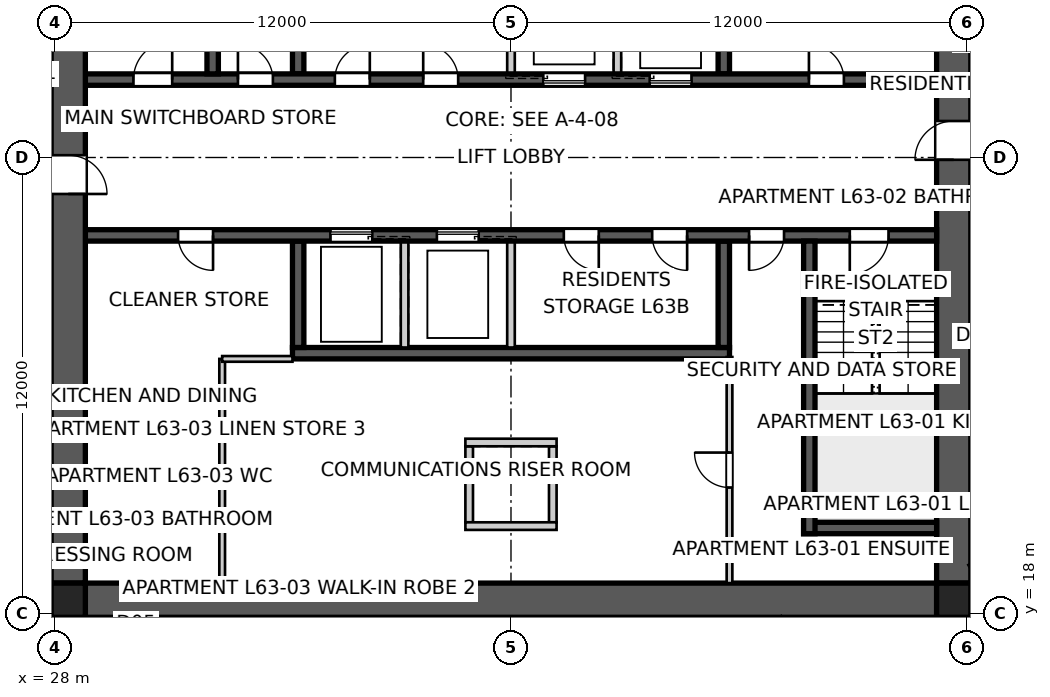
"""IFC4 building model, lengths in metres.
Left out: names, types, materials, properties, quantities, classifications, styles, units other than length and angle.
Written with IfcOpenShell. Run it as: python <this file> out.ifc"""

import sys

from ifc_helpers import new_model, si_unit, direction, frame, frame_2d, origin, origin_2d, place, context, subcontext, project, spatial, polyline, rectangle, outline, extrude, element, fill, save


model = new_model("IFC4")
c1 = context("Model", 3, precision=1e-05, world=origin(), true_north=direction((0.0, 1.0)))
c2 = subcontext(c1, "Body", "Model", "MODEL_VIEW")
j1 = project(units=[si_unit("LENGTHUNIT", "METRE"), si_unit("PLANEANGLEUNIT", "RADIAN")], contexts=[c1])
p1 = place(None, origin())
s1 = spatial("IfcSite", under=j1, at=p1, CompositionType="ELEMENT")
p2 = place(p1, origin())
s2 = spatial("IfcBuilding", under=s1, at=p2, CompositionType="ELEMENT")
p3 = place(p2, frame((0.0, 0.0, 228.6)))
s3 = spatial("IfcBuildingStorey", under=s2, at=p3, CompositionType="ELEMENT", Elevation=228.6)
p4 = place(p3, frame((51.2, 18.35, 0.0), z_axis=(0.0, 0.0, 1.0), x_axis=(-1.0, 0.0, 0.0)))
e1 = element("IfcWall", 1, at=p4, inside=s3, PredefinedType="SHEAR", context=c2, shape_type="SweptSolid", body=[
    extrude(outline(polyline([(0.0, -0.45), (22.4, -0.45), (22.4, -0.025), (22.85, -0.025), (22.85, 0.025), (22.4, 0.025), (22.4, 0.45), (0.0, 0.45), (0.0, 0.025), (-0.45, 0.025), (-0.45, -0.025), (0.0, -0.025), (0.0, -0.45)])), origin(), (0.0, 0.0, 1.0), 3.4),
])
p5 = place(p3, frame((51.65, 18.8, 0.0), z_axis=(0.0, 0.0, 1.0), x_axis=(0.0, 1.0, 0.0)))
e2 = element("IfcWall", 2, at=p5, inside=s3, PredefinedType="SHEAR", context=c2, shape_type="SweptSolid", body=[
    extrude(outline(polyline([(0.0, -0.45), (22.4, -0.45), (22.4, -0.025), (22.85, -0.025), (22.85, 0.025), (22.4, 0.025), (22.4, 0.45), (0.0, 0.45), (0.0, 0.025), (-0.45, 0.025), (-0.45, -0.025), (0.0, -0.025), (0.0, -0.45)])), origin(), (0.0, 0.0, 1.0), 3.4),
])
p6 = place(p5, frame((11.14, 0.0, 0.0)))
e3 = element("IfcOpeningElement", 3, at=p6, cuts=e2, PredefinedType="OPENING", context=c2, shape_type="SweptSolid", body=[
    extrude(rectangle(XDim=1.02, YDim=2.4, at=frame_2d((0.51, 1.2))), frame((0.0, 0.46, 0.0), z_axis=(0.0, -1.0, 0.0), x_axis=(1.0, 0.0, 0.0)), (0.0, 0.0, 1.0), 0.92),
])
p7 = place(p3, frame((28.35, 41.2, 0.0), z_axis=(0.0, 0.0, 1.0), x_axis=(0.0, -1.0, 0.0)))
e4 = element("IfcWall", 4, at=p7, inside=s3, PredefinedType="SHEAR", context=c2, shape_type="SweptSolid", body=[
    extrude(outline(polyline([(0.0, -0.45), (22.4, -0.45), (22.4, -0.025), (22.85, -0.025), (22.85, 0.025), (22.4, 0.025), (22.4, 0.45), (0.0, 0.45), (0.0, 0.025), (-0.45, 0.025), (-0.45, -0.025), (0.0, -0.025), (0.0, -0.45)])), origin(), (0.0, 0.0, 1.0), 3.4),
])
p8 = place(p7, frame((11.14, 0.0, 0.0)))
e5 = element("IfcOpeningElement", 5, at=p8, cuts=e4, PredefinedType="OPENING", context=c2, shape_type="SweptSolid", body=[
    extrude(rectangle(XDim=1.02, YDim=2.4, at=frame_2d((0.51, 1.2))), frame((0.0, 0.46, 0.0), z_axis=(0.0, -1.0, 0.0), x_axis=(1.0, 0.0, 0.0)), (0.0, 0.0, 1.0), 0.92),
])
p9 = place(p3, frame((28.8, 32.05, 0.0), z_axis=(0.0, 0.0, 1.0), x_axis=(1.0, 0.0, 0.0)))
e6 = element("IfcWall", 6, at=p9, inside=s3, PredefinedType="SHEAR", context=c2, shape_type="SweptSolid", body=[
    extrude(rectangle(XDim=22.4, YDim=0.3, at=frame_2d((11.2, 0.0))), origin(), (0.0, 0.0, 1.0), 3.4),
])
p10 = place(p9, frame((19.04, 0.0, 0.0)))
e7 = element("IfcOpeningElement", 7, at=p10, cuts=e6, PredefinedType="OPENING", context=c2, shape_type="SweptSolid", body=[
    extrude(rectangle(XDim=0.92, YDim=2.1, at=frame_2d((0.46, 1.05))), frame((0.0, 0.16, 0.0), z_axis=(0.0, -1.0, 0.0), x_axis=(1.0, 0.0, 0.0)), (0.0, 0.0, 1.0), 0.32),
])
p11 = place(p9, frame((1.265, 0.0, 0.0)))
e8 = element("IfcOpeningElement", 8, at=p11, cuts=e6, PredefinedType="OPENING", context=c2, shape_type="SweptSolid", body=[
    extrude(rectangle(XDim=1.02, YDim=2.1, at=frame_2d((0.51, 1.05))), frame((0.0, 0.16, 0.0), z_axis=(0.0, -1.0, 0.0), x_axis=(1.0, 0.0, 0.0)), (0.0, 0.0, 1.0), 0.32),
])
p12 = place(p9, frame((4.015, 0.0, 0.0)))
e9 = element("IfcOpeningElement", 9, at=p12, cuts=e6, PredefinedType="OPENING", context=c2, shape_type="SweptSolid", body=[
    extrude(rectangle(XDim=0.92, YDim=2.1, at=frame_2d((0.46, 1.05))), frame((0.0, 0.16, 0.0), z_axis=(0.0, -1.0, 0.0), x_axis=(1.0, 0.0, 0.0)), (0.0, 0.0, 1.0), 0.32),
])
p13 = place(p9, frame((6.565, 0.0, 0.0)))
e10 = element("IfcOpeningElement", 10, at=p13, cuts=e6, PredefinedType="OPENING", context=c2, shape_type="SweptSolid", body=[
    extrude(rectangle(XDim=0.92, YDim=2.1, at=frame_2d((0.46, 1.05))), frame((0.0, 0.16, 0.0), z_axis=(0.0, -1.0, 0.0), x_axis=(1.0, 0.0, 0.0)), (0.0, 0.0, 1.0), 0.32),
])
p14 = place(p9, frame((8.89, 0.0, 0.0)))
e11 = element("IfcOpeningElement", 11, at=p14, cuts=e6, PredefinedType="OPENING", context=c2, shape_type="SweptSolid", body=[
    extrude(rectangle(XDim=0.92, YDim=2.1, at=frame_2d((0.46, 1.05))), frame((0.0, 0.16, 0.0), z_axis=(0.0, -1.0, 0.0), x_axis=(1.0, 0.0, 0.0)), (0.0, 0.0, 1.0), 0.32),
])
p15 = place(p9, frame((12.05, 0.0, 0.0)))
e12 = element("IfcOpeningElement", 12, at=p15, cuts=e6, PredefinedType="OPENING", context=c2, shape_type="SweptSolid", body=[
    extrude(rectangle(XDim=1.1, YDim=2.1, at=frame_2d((0.55, 1.05))), frame((0.0, 0.16, 0.0), z_axis=(0.0, -1.0, 0.0), x_axis=(1.0, 0.0, 0.0)), (0.0, 0.0, 1.0), 0.32),
])
p16 = place(p9, frame((14.85, 0.0, 0.0)))
e13 = element("IfcOpeningElement", 13, at=p16, cuts=e6, PredefinedType="OPENING", context=c2, shape_type="SweptSolid", body=[
    extrude(rectangle(XDim=1.1, YDim=2.1, at=frame_2d((0.55, 1.05))), frame((0.0, 0.16, 0.0), z_axis=(0.0, -1.0, 0.0), x_axis=(1.0, 0.0, 0.0)), (0.0, 0.0, 1.0), 0.32),
])
p17 = place(p3, frame((51.2, 27.95, 0.0), z_axis=(0.0, 0.0, 1.0), x_axis=(-1.0, 0.0, 0.0)))
e14 = element("IfcWall", 14, at=p17, inside=s3, PredefinedType="SHEAR", context=c2, shape_type="SweptSolid", body=[
    extrude(rectangle(XDim=22.4, YDim=0.3, at=frame_2d((11.2, 0.0))), origin(), (0.0, 0.0, 1.0), 3.4),
])
p18 = place(p17, frame((19.04, 0.0, 0.0)))
e15 = element("IfcOpeningElement", 15, at=p18, cuts=e14, PredefinedType="OPENING", context=c2, shape_type="SweptSolid", body=[
    extrude(rectangle(XDim=0.92, YDim=2.1, at=frame_2d((0.46, 1.05))), frame((0.0, 0.16, 0.0), z_axis=(0.0, -1.0, 0.0), x_axis=(1.0, 0.0, 0.0)), (0.0, 0.0, 1.0), 0.32),
])
p19 = place(p17, frame((1.265, 0.0, 0.0)))
e16 = element("IfcOpeningElement", 16, at=p19, cuts=e14, PredefinedType="OPENING", context=c2, shape_type="SweptSolid", body=[
    extrude(rectangle(XDim=1.02, YDim=2.1, at=frame_2d((0.51, 1.05))), frame((0.0, 0.16, 0.0), z_axis=(0.0, -1.0, 0.0), x_axis=(1.0, 0.0, 0.0)), (0.0, 0.0, 1.0), 0.32),
])
p20 = place(p17, frame((4.015, 0.0, 0.0)))
e17 = element("IfcOpeningElement", 17, at=p20, cuts=e14, PredefinedType="OPENING", context=c2, shape_type="SweptSolid", body=[
    extrude(rectangle(XDim=0.92, YDim=2.1, at=frame_2d((0.46, 1.05))), frame((0.0, 0.16, 0.0), z_axis=(0.0, -1.0, 0.0), x_axis=(1.0, 0.0, 0.0)), (0.0, 0.0, 1.0), 0.32),
])
p21 = place(p17, frame((8.89, 0.0, 0.0)))
e18 = element("IfcOpeningElement", 18, at=p21, cuts=e14, PredefinedType="OPENING", context=c2, shape_type="SweptSolid", body=[
    extrude(rectangle(XDim=0.92, YDim=2.1, at=frame_2d((0.46, 1.05))), frame((0.0, 0.16, 0.0), z_axis=(0.0, -1.0, 0.0), x_axis=(1.0, 0.0, 0.0)), (0.0, 0.0, 1.0), 0.32),
])
p22 = place(p17, frame((6.565, 0.0, 0.0)))
e19 = element("IfcOpeningElement", 19, at=p22, cuts=e14, PredefinedType="OPENING", context=c2, shape_type="SweptSolid", body=[
    extrude(rectangle(XDim=0.92, YDim=2.1, at=frame_2d((0.46, 1.05))), frame((0.0, 0.16, 0.0), z_axis=(0.0, -1.0, 0.0), x_axis=(1.0, 0.0, 0.0)), (0.0, 0.0, 1.0), 0.32),
])
p23 = place(p17, frame((12.05, 0.0, 0.0)))
e20 = element("IfcOpeningElement", 20, at=p23, cuts=e14, PredefinedType="OPENING", context=c2, shape_type="SweptSolid", body=[
    extrude(rectangle(XDim=1.1, YDim=2.1, at=frame_2d((0.55, 1.05))), frame((0.0, 0.16, 0.0), z_axis=(0.0, -1.0, 0.0), x_axis=(1.0, 0.0, 0.0)), (0.0, 0.0, 1.0), 0.32),
])
p24 = place(p17, frame((14.85, 0.0, 0.0)))
e21 = element("IfcOpeningElement", 21, at=p24, cuts=e14, PredefinedType="OPENING", context=c2, shape_type="SweptSolid", body=[
    extrude(rectangle(XDim=1.1, YDim=2.1, at=frame_2d((0.55, 1.05))), frame((0.0, 0.16, 0.0), z_axis=(0.0, -1.0, 0.0), x_axis=(1.0, 0.0, 0.0)), (0.0, 0.0, 1.0), 0.32),
])
p25 = place(p3, frame((45.75, 24.85, 0.0), z_axis=(0.0, 0.0, 1.0), x_axis=(-1.0, 0.0, 0.0)))
e22 = element("IfcWall", 22, at=p25, inside=s3, PredefinedType="SHEAR", context=c2, shape_type="SweptSolid", body=[
    extrude(rectangle(XDim=11.5, YDim=0.3, at=frame_2d((5.75, 0.0))), origin(), (0.0, 0.0, 1.0), 3.4),
])
for number, where, z_axis, x_axis in (
    (23, (34.4, 32.2, 0.0), (0.0, 0.0, 1.0), (0.0, 1.0, 0.0)),
    (24, (45.6, 27.8, 0.0), (0.0, 0.0, 1.0), (0.0, -1.0, 0.0)),
):
    element("IfcWall", number, at=place(p3, frame(where, z_axis=z_axis, x_axis=x_axis)), inside=s3, PredefinedType="SHEAR", context=c2, shape_type="SweptSolid", body=[
        extrude(rectangle(XDim=2.8, YDim=0.3, at=frame_2d((1.4, 0.0))), origin(), (0.0, 0.0, 1.0), 3.4),
    ])
for number, where, z_axis, x_axis in (
    (25, (40.0, 32.2, 0.0), (0.0, 0.0, 1.0), (0.0, 1.0, 0.0)),
    (26, (40.0, 27.8, 0.0), (0.0, 0.0, 1.0), (0.0, -1.0, 0.0)),
    (27, (42.8, 32.2, 0.0), (0.0, 0.0, 1.0), (0.0, 1.0, 0.0)),
    (28, (37.2, 27.8, 0.0), (0.0, 0.0, 1.0), (0.0, -1.0, 0.0)),
):
    element("IfcWall", number, at=place(p3, frame(where, z_axis=z_axis, x_axis=x_axis)), inside=s3, PredefinedType="SOLIDWALL", context=c2, shape_type="SweptSolid", body=[
        extrude(rectangle(XDim=2.8, YDim=0.2, at=frame_2d((1.4, 0.0))), origin(), (0.0, 0.0, 1.0), 3.4),
    ])
for number, where, z_axis, x_axis in (
    (29, (45.6, 32.2, 0.0), (0.0, 0.0, 1.0), (0.0, 1.0, 0.0)),
    (30, (34.4, 27.8, 0.0), (0.0, 0.0, 1.0), (0.0, -1.0, 0.0)),
):
    element("IfcWall", number, at=place(p3, frame(where, z_axis=z_axis, x_axis=x_axis)), inside=s3, PredefinedType="SHEAR", context=c2, shape_type="SweptSolid", body=[
        extrude(rectangle(XDim=2.8, YDim=0.3, at=frame_2d((1.4, 0.0))), origin(), (0.0, 0.0, 1.0), 3.4),
    ])
for number, where, z_axis, x_axis in (
    (31, (32.15, 32.2, 0.0), (0.0, 0.0, 1.0), (0.0, 1.0, 0.0)),
    (32, (47.85, 27.8, 0.0), (0.0, 0.0, 1.0), (0.0, -1.0, 0.0)),
):
    element("IfcWall", number, at=place(p3, frame(where, z_axis=z_axis, x_axis=x_axis)), inside=s3, PredefinedType="SHEAR", context=c2, shape_type="SweptSolid", body=[
        extrude(rectangle(XDim=7.7, YDim=0.3, at=frame_2d((3.85, 0.0))), origin(), (0.0, 0.0, 1.0), 3.4),
    ])
p26 = place(p3, frame((51.2, 20.25, 0.0), z_axis=(0.0, 0.0, 1.0), x_axis=(-1.0, 0.0, 0.0)))
e33 = element("IfcWall", 33, at=p26, inside=s3, PredefinedType="SHEAR", context=c2, shape_type="SweptSolid", body=[
    extrude(rectangle(XDim=3.5, YDim=0.3, at=frame_2d((1.75, 0.0))), origin(), (0.0, 0.0, 1.0), 3.4),
])
for number, where, z_axis, x_axis in (
    (34, (38.9, 22.4, 0.0), (0.0, 0.0, 1.0), (0.0, -1.0, 0.0)),
    (35, (41.1, 22.4, 0.0), (0.0, 0.0, 1.0), (0.0, -1.0, 0.0)),
):
    element("IfcWall", number, at=place(p3, frame(where, z_axis=z_axis, x_axis=x_axis)), inside=s3, PredefinedType="SOLIDWALL", context=c2, shape_type="SweptSolid", body=[
        extrude(rectangle(XDim=2.0, YDim=0.2, at=frame_2d((1.0, 0.0))), origin(), (0.0, 0.0, 1.0), 3.4),
    ])
for number, where, z_axis, x_axis in (
    (36, (38.8, 22.5, 0.0), (0.0, 0.0, 1.0), (1.0, 0.0, 0.0)),
    (37, (38.8, 20.3, 0.0), (0.0, 0.0, 1.0), (1.0, 0.0, 0.0)),
):
    element("IfcWall", number, at=place(p3, frame(where, z_axis=z_axis, x_axis=x_axis)), inside=s3, PredefinedType="SOLIDWALL", context=c2, shape_type="SweptSolid", body=[
        extrude(rectangle(XDim=2.4, YDim=0.2, at=frame_2d((1.2, 0.0))), origin(), (0.0, 0.0, 1.0), 3.4),
    ])
for number, where, z_axis, x_axis in (
    (38, (28.35, 18.35, 0.0), (0.0, 0.0, 1.0), (1.0, 0.0, 0.0)),
    (39, (51.65, 18.35, 0.0), (0.0, 0.0, 1.0), (1.0, 0.0, 0.0)),
):
    element("IfcColumn", number, at=place(p3, frame(where, z_axis=z_axis, x_axis=x_axis)), inside=s3, PredefinedType="COLUMN", context=c2, shape_type="SweptSolid", body=[
        extrude(rectangle(XDim=0.9, YDim=0.9, at=origin_2d()), origin(), (0.0, 0.0, 1.0), 3.4),
    ])
p27 = place(p3, frame((51.25, 10.514, 0.0), z_axis=(0.0, 0.0, 1.0), x_axis=(-0.500008511703, 0.866020489494, 0.0)))
e40 = element("IfcWall", 40, at=p27, inside=s3, PredefinedType="PARTITIONING", context=c2, shape_type="SweptSolid", body=[
    extrude(rectangle(XDim=8.496, YDim=0.25, at=frame_2d((4.248, 0.0))), origin(), (0.0, 0.0, 1.0), 3.25),
])
p28 = place(p3, frame((45.75, 18.8, 0.0), z_axis=(0.0, 0.0, 1.0), x_axis=(0.0, 1.0, 0.0)))
e41 = element("IfcWall", 41, at=p28, inside=s3, PredefinedType="SOLIDWALL", context=c2, shape_type="SweptSolid", body=[
    extrude(rectangle(XDim=5.95, YDim=0.15, at=frame_2d((2.975, 0.0))), origin(), (0.0, 0.0, 1.0), 3.25),
])
p29 = place(p28, frame((2.515, 0.0, 0.0)))
e42 = element("IfcOpeningElement", 42, at=p29, cuts=e41, PredefinedType="OPENING", context=c2, shape_type="SweptSolid", body=[
    extrude(rectangle(XDim=0.92, YDim=2.1, at=frame_2d((0.46, 1.05))), frame((0.0, 0.085, 0.0), z_axis=(0.0, -1.0, 0.0), x_axis=(1.0, 0.0, 0.0)), (0.0, 0.0, 1.0), 0.17),
])
p30 = place(p3, frame((32.4, 18.8, 0.0), z_axis=(0.0, 0.0, 1.0), x_axis=(0.0, 1.0, 0.0)))
e43 = element("IfcWall", 43, at=p30, inside=s3, PredefinedType="SOLIDWALL", context=c2, shape_type="SweptSolid", body=[
    extrude(rectangle(XDim=5.9, YDim=0.15, at=frame_2d((2.95, 0.0))), origin(), (0.0, 0.0, 1.0), 3.25),
])
p31 = place(p3, frame((32.4, 24.7, 0.0), z_axis=(0.0, 0.0, 1.0), x_axis=(1.0, 0.0, 0.0)))
e44 = element("IfcWall", 44, at=p31, inside=s3, PredefinedType="SOLIDWALL", context=c2, shape_type="SweptSolid", body=[
    extrude(rectangle(XDim=1.85, YDim=0.15, at=frame_2d((0.925, 0.0))), origin(), (0.0, 0.0, 1.0), 3.25),
])
p32 = place(p3, frame((53.779, 16.406, 0.0), z_axis=(0.0, 0.0, 1.0), x_axis=(-0.499969954228, 0.866042750024, 0.0)))
e45 = element("IfcWall", 45, at=p32, inside=s3, PredefinedType="SOLIDWALL", context=c2, shape_type="SweptSolid", body=[
    extrude(rectangle(XDim=3.359, YDim=0.15, at=frame_2d((1.679, 0.0))), origin(), (0.0, 0.0, 1.0), 3.25),
])
p33 = place(p32, frame((0.301, 0.0, 0.0)))
e46 = element("IfcOpeningElement", 46, at=p33, cuts=e45, PredefinedType="OPENING", context=c2, shape_type="SweptSolid", body=[
    extrude(rectangle(XDim=0.92, YDim=2.1, at=frame_2d((0.46, 1.05))), frame((0.0, 0.085, 0.0), z_axis=(0.0, -1.0, 0.0), x_axis=(1.0, 0.0, 0.0)), (0.0, 0.0, 1.0), 0.17),
])
p34 = place(p3, frame((28.8, 17.9, 0.0), z_axis=(0.0, 0.0, 1.0), x_axis=(-1.0, 0.0, 0.0)))
e47 = element("IfcWall", 47, at=p34, inside=s3, PredefinedType="SOLIDWALL", context=c2, shape_type="SweptSolid", body=[
    extrude(rectangle(XDim=1.342, YDim=0.15, at=frame_2d((0.671, 0.0))), origin(), (0.0, 0.0, 1.0), 3.25),
])
p35 = place(p10, origin())
e48 = element("IfcDoor", 48, at=p35, inside=s3, OperationType="SINGLE_SWING_LEFT", PredefinedType="DOOR", context=c2, shape_type="SweptSolid", body=[
    extrude(rectangle(XDim=0.92, YDim=2.1, at=frame_2d((0.46, 1.05))), frame((0.0, 0.025, 0.0), z_axis=(0.0, -1.0, 0.0), x_axis=(1.0, 0.0, 0.0)), (0.0, 0.0, 1.0), 0.05),
])
fill(e7, e48)
p36 = place(p18, origin())
e49 = element("IfcDoor", 49, at=p36, inside=s3, OperationType="SINGLE_SWING_LEFT", PredefinedType="DOOR", context=c2, shape_type="SweptSolid", body=[
    extrude(rectangle(XDim=0.92, YDim=2.1, at=frame_2d((0.46, 1.05))), frame((0.0, 0.025, 0.0), z_axis=(0.0, -1.0, 0.0), x_axis=(1.0, 0.0, 0.0)), (0.0, 0.0, 1.0), 0.05),
])
fill(e15, e49)
p37 = place(p19, origin())
e50 = element("IfcDoor", 50, at=p37, inside=s3, OperationType="SINGLE_SWING_RIGHT", PredefinedType="DOOR", context=c2, shape_type="SweptSolid", body=[
    extrude(rectangle(XDim=1.02, YDim=2.1, at=frame_2d((0.51, 1.05))), frame((0.0, 0.025, 0.0), z_axis=(0.0, -1.0, 0.0), x_axis=(1.0, 0.0, 0.0)), (0.0, 0.0, 1.0), 0.05),
])
fill(e16, e50)
p38 = place(p11, origin())
e51 = element("IfcDoor", 51, at=p38, inside=s3, OperationType="SINGLE_SWING_RIGHT", PredefinedType="DOOR", context=c2, shape_type="SweptSolid", body=[
    extrude(rectangle(XDim=1.02, YDim=2.1, at=frame_2d((0.51, 1.05))), frame((0.0, 0.025, 0.0), z_axis=(0.0, -1.0, 0.0), x_axis=(1.0, 0.0, 0.0)), (0.0, 0.0, 1.0), 0.05),
])
fill(e8, e51)
p39 = place(p12, origin())
e52 = element("IfcDoor", 52, at=p39, inside=s3, OperationType="SINGLE_SWING_LEFT", PredefinedType="DOOR", context=c2, shape_type="SweptSolid", body=[
    extrude(rectangle(XDim=0.92, YDim=2.1, at=frame_2d((0.46, 1.05))), frame((0.0, 0.025, 0.0), z_axis=(0.0, -1.0, 0.0), x_axis=(1.0, 0.0, 0.0)), (0.0, 0.0, 1.0), 0.05),
])
fill(e9, e52)
p40 = place(p20, origin())
e53 = element("IfcDoor", 53, at=p40, inside=s3, OperationType="SINGLE_SWING_RIGHT", PredefinedType="DOOR", context=c2, shape_type="SweptSolid", body=[
    extrude(rectangle(XDim=0.92, YDim=2.1, at=frame_2d((0.46, 1.05))), frame((0.0, 0.025, 0.0), z_axis=(0.0, -1.0, 0.0), x_axis=(1.0, 0.0, 0.0)), (0.0, 0.0, 1.0), 0.05),
])
fill(e17, e53)
p41 = place(p29, origin())
e54 = element("IfcDoor", 54, at=p41, inside=s3, OperationType="SINGLE_SWING_RIGHT", PredefinedType="DOOR", context=c2, shape_type="SweptSolid", body=[
    extrude(rectangle(XDim=0.92, YDim=2.1, at=frame_2d((0.46, 1.05))), frame((0.0, 0.025, 0.0), z_axis=(0.0, -1.0, 0.0), x_axis=(1.0, 0.0, 0.0)), (0.0, 0.0, 1.0), 0.05),
])
fill(e42, e54)
p42 = place(p13, origin())
e55 = element("IfcDoor", 55, at=p42, inside=s3, OperationType="SINGLE_SWING_RIGHT", PredefinedType="DOOR", context=c2, shape_type="SweptSolid", body=[
    extrude(rectangle(XDim=0.92, YDim=2.1, at=frame_2d((0.46, 1.05))), frame((0.0, 0.025, 0.0), z_axis=(0.0, -1.0, 0.0), x_axis=(1.0, 0.0, 0.0)), (0.0, 0.0, 1.0), 0.05),
])
fill(e10, e55)
p43 = place(p14, origin())
e56 = element("IfcDoor", 56, at=p43, inside=s3, OperationType="SINGLE_SWING_LEFT", PredefinedType="DOOR", context=c2, shape_type="SweptSolid", body=[
    extrude(rectangle(XDim=0.92, YDim=2.1, at=frame_2d((0.46, 1.05))), frame((0.0, 0.025, 0.0), z_axis=(0.0, -1.0, 0.0), x_axis=(1.0, 0.0, 0.0)), (0.0, 0.0, 1.0), 0.05),
])
fill(e11, e56)
p44 = place(p21, origin())
e57 = element("IfcDoor", 57, at=p44, inside=s3, OperationType="SINGLE_SWING_LEFT", PredefinedType="DOOR", context=c2, shape_type="SweptSolid", body=[
    extrude(rectangle(XDim=0.92, YDim=2.1, at=frame_2d((0.46, 1.05))), frame((0.0, 0.025, 0.0), z_axis=(0.0, -1.0, 0.0), x_axis=(1.0, 0.0, 0.0)), (0.0, 0.0, 1.0), 0.05),
])
fill(e18, e57)
p45 = place(p22, origin())
e58 = element("IfcDoor", 58, at=p45, inside=s3, OperationType="SINGLE_SWING_LEFT", PredefinedType="DOOR", context=c2, shape_type="SweptSolid", body=[
    extrude(rectangle(XDim=0.92, YDim=2.1, at=frame_2d((0.46, 1.05))), frame((0.0, 0.025, 0.0), z_axis=(0.0, -1.0, 0.0), x_axis=(1.0, 0.0, 0.0)), (0.0, 0.0, 1.0), 0.05),
])
fill(e19, e58)
p46 = place(p6, origin())
e59 = element("IfcDoor", 59, at=p46, inside=s3, OperationType="SINGLE_SWING_LEFT", PredefinedType="DOOR", context=c2, shape_type="SweptSolid", body=[
    extrude(rectangle(XDim=1.02, YDim=2.4, at=frame_2d((0.51, 1.2))), frame((0.0, 0.025, 0.0), z_axis=(0.0, -1.0, 0.0), x_axis=(1.0, 0.0, 0.0)), (0.0, 0.0, 1.0), 0.05),
])
fill(e3, e59)
p47 = place(p8, origin())
e60 = element("IfcDoor", 60, at=p47, inside=s3, OperationType="SINGLE_SWING_RIGHT", PredefinedType="DOOR", context=c2, shape_type="SweptSolid", body=[
    extrude(rectangle(XDim=1.02, YDim=2.4, at=frame_2d((0.51, 1.2))), frame((0.0, 0.025, 0.0), z_axis=(0.0, -1.0, 0.0), x_axis=(1.0, 0.0, 0.0)), (0.0, 0.0, 1.0), 0.05),
])
fill(e5, e60)
p48 = place(p15, origin())
e61 = element("IfcDoor", 61, at=p48, inside=s3, OperationType="SLIDING_TO_LEFT", PredefinedType="DOOR", context=c2, shape_type="SweptSolid", body=[
    extrude(rectangle(XDim=1.1, YDim=2.1, at=frame_2d((0.55, 1.05))), frame((0.0, 0.025, 0.0), z_axis=(0.0, -1.0, 0.0), x_axis=(1.0, 0.0, 0.0)), (0.0, 0.0, 1.0), 0.05),
])
fill(e12, e61)
p49 = place(p23, origin())
e62 = element("IfcDoor", 62, at=p49, inside=s3, OperationType="SLIDING_TO_LEFT", PredefinedType="DOOR", context=c2, shape_type="SweptSolid", body=[
    extrude(rectangle(XDim=1.1, YDim=2.1, at=frame_2d((0.55, 1.05))), frame((0.0, 0.025, 0.0), z_axis=(0.0, -1.0, 0.0), x_axis=(1.0, 0.0, 0.0)), (0.0, 0.0, 1.0), 0.05),
])
fill(e20, e62)
p50 = place(p16, origin())
e63 = element("IfcDoor", 63, at=p50, inside=s3, OperationType="SLIDING_TO_LEFT", PredefinedType="DOOR", context=c2, shape_type="SweptSolid", body=[
    extrude(rectangle(XDim=1.1, YDim=2.1, at=frame_2d((0.55, 1.05))), frame((0.0, 0.025, 0.0), z_axis=(0.0, -1.0, 0.0), x_axis=(1.0, 0.0, 0.0)), (0.0, 0.0, 1.0), 0.05),
])
fill(e13, e63)
p51 = place(p24, origin())
e64 = element("IfcDoor", 64, at=p51, inside=s3, OperationType="SLIDING_TO_LEFT", PredefinedType="DOOR", context=c2, shape_type="SweptSolid", body=[
    extrude(rectangle(XDim=1.1, YDim=2.1, at=frame_2d((0.55, 1.05))), frame((0.0, 0.025, 0.0), z_axis=(0.0, -1.0, 0.0), x_axis=(1.0, 0.0, 0.0)), (0.0, 0.0, 1.0), 0.05),
])
fill(e21, e64)
save(model, sys.argv[1])
